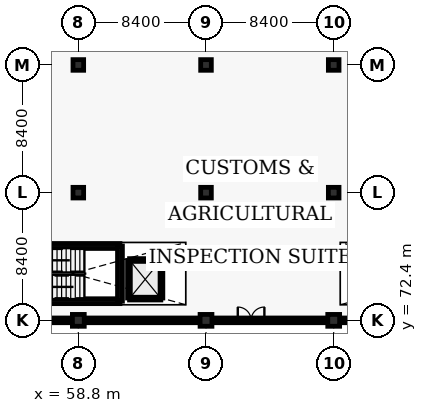
"""IFC4 building model, lengths in metres.
Left out: names, types, materials, properties, quantities, classifications, styles, units other than length and angle.
Written with IfcOpenShell. Run it as: python <this file> out.ifc"""

import sys

from ifc_helpers import new_model, si_unit, direction, frame, frame_2d, origin, origin_2d, place, context, subcontext, project, spatial, rectangle, circle, extrude, element, fill, save


model = new_model("IFC4")
c1 = context("Model", 3, precision=1e-05, world=origin(), true_north=direction((0.0, 1.0)))
c2 = subcontext(c1, "Body", "Model", "MODEL_VIEW")
j1 = project(units=[si_unit("LENGTHUNIT", "METRE"), si_unit("PLANEANGLEUNIT", "RADIAN")], contexts=[c1])
p1 = place(None, origin())
s1 = spatial("IfcSite", under=j1, at=p1, CompositionType="ELEMENT")
p2 = place(p1, origin())
s2 = spatial("IfcBuilding", under=s1, at=p2, CompositionType="ELEMENT")
p3 = place(p2, origin())
s3 = spatial("IfcBuildingStorey", under=s2, at=p3, CompositionType="ELEMENT", Elevation=0.0)
p4 = place(p3, frame((58.8, 72.4, -0.46), z_axis=(0.0, 0.0, 1.0), x_axis=(1.0, 0.0, 0.0)))
e1 = element("IfcColumn", 1, at=p4, inside=s3, PredefinedType="COLUMN", context=c2, shape_type="SweptSolid", body=[
    extrude(circle(Radius=0.39, at=origin_2d()), origin(), (0.0, 0.0, 1.0), 5.9),
])
for number, where, z_axis, x_axis in (
    (2, (58.8, 80.8, -0.46), (0.0, 0.0, 1.0), (1.0, 0.0, 0.0)),
    (3, (58.8, 89.2, -0.46), (0.0, 0.0, 1.0), (1.0, 0.0, 0.0)),
):
    element("IfcColumn", number, at=place(p3, frame(where, z_axis=z_axis, x_axis=x_axis)), inside=s3, PredefinedType="COLUMN", context=c2, shape_type="SweptSolid", body=[
        extrude(rectangle(XDim=0.7, YDim=0.7, at=origin_2d()), origin(), (0.0, 0.0, 1.0), 5.9),
    ])
p5 = place(p3, frame((67.2, 72.4, -0.46), z_axis=(0.0, 0.0, 1.0), x_axis=(1.0, 0.0, 0.0)))
e4 = element("IfcColumn", 4, at=p5, inside=s3, PredefinedType="COLUMN", context=c2, shape_type="SweptSolid", body=[
    extrude(circle(Radius=0.39, at=origin_2d()), origin(), (0.0, 0.0, 1.0), 5.9),
])
for number, where, z_axis, x_axis in (
    (5, (67.2, 80.8, -0.46), (0.0, 0.0, 1.0), (1.0, 0.0, 0.0)),
    (6, (67.2, 89.2, -0.46), (0.0, 0.0, 1.0), (1.0, 0.0, 0.0)),
):
    element("IfcColumn", number, at=place(p3, frame(where, z_axis=z_axis, x_axis=x_axis)), inside=s3, PredefinedType="COLUMN", context=c2, shape_type="SweptSolid", body=[
        extrude(rectangle(XDim=0.7, YDim=0.7, at=origin_2d()), origin(), (0.0, 0.0, 1.0), 5.9),
    ])
p6 = place(p3, frame((75.6, 72.4, -0.46), z_axis=(0.0, 0.0, 1.0), x_axis=(1.0, 0.0, 0.0)))
e7 = element("IfcColumn", 7, at=p6, inside=s3, PredefinedType="COLUMN", context=c2, shape_type="SweptSolid", body=[
    extrude(circle(Radius=0.39, at=origin_2d()), origin(), (0.0, 0.0, 1.0), 5.9),
])
for number, where, z_axis, x_axis in (
    (8, (75.6, 80.8, -0.46), (0.0, 0.0, 1.0), (1.0, 0.0, 0.0)),
    (9, (75.6, 89.2, -0.46), (0.0, 0.0, 1.0), (1.0, 0.0, 0.0)),
):
    element("IfcColumn", number, at=place(p3, frame(where, z_axis=z_axis, x_axis=x_axis)), inside=s3, PredefinedType="COLUMN", context=c2, shape_type="SweptSolid", body=[
        extrude(rectangle(XDim=0.7, YDim=0.7, at=origin_2d()), origin(), (0.0, 0.0, 1.0), 5.9),
    ])
p7 = place(p3, frame((50.79, 72.4, 0.0), z_axis=(0.0, 0.0, 1.0), x_axis=(1.0, 0.0, 0.0)))
e10 = element("IfcWall", 10, at=p7, inside=s3, PredefinedType="SOLIDWALL", context=c2, shape_type="SweptSolid", body=[
    extrude(rectangle(XDim=7.62, YDim=0.31, at=frame_2d((3.81, 0.0))), origin(), (0.0, 0.0, 1.0), 4.825),
])
p8 = place(p7, frame((1.7, 0.0, 0.0)))
e11 = element("IfcOpeningElement", 11, at=p8, cuts=e10, PredefinedType="OPENING", context=c2, shape_type="SweptSolid", body=[
    extrude(rectangle(XDim=1.75, YDim=2.15, at=frame_2d((0.875, 1.075))), frame((0.0, 0.165, 0.0), z_axis=(0.0, -1.0, 0.0), x_axis=(1.0, 0.0, 0.0)), (0.0, 0.0, 1.0), 0.33),
])
p9 = place(p7, frame((4.35, 0.0, 1.0)))
e12 = element("IfcOpeningElement", 12, at=p9, cuts=e10, PredefinedType="OPENING", context=c2, shape_type="SweptSolid", body=[
    extrude(rectangle(XDim=2.2, YDim=1.55, at=frame_2d((1.1, 0.775))), frame((0.0, 0.165, 0.0), z_axis=(0.0, -1.0, 0.0), x_axis=(1.0, 0.0, 0.0)), (0.0, 0.0, 1.0), 0.33),
])
p10 = place(p3, frame((59.19, 72.4, 0.0), z_axis=(0.0, 0.0, 1.0), x_axis=(1.0, 0.0, 0.0)))
e13 = element("IfcWall", 13, at=p10, inside=s3, PredefinedType="SOLIDWALL", context=c2, shape_type="SweptSolid", body=[
    extrude(rectangle(XDim=7.62, YDim=0.31, at=frame_2d((3.81, 0.0))), origin(), (0.0, 0.0, 1.0), 4.605),
])
p11 = place(p10, frame((2.8, 0.0, 1.0)))
e14 = element("IfcOpeningElement", 14, at=p11, cuts=e13, PredefinedType="OPENING", context=c2, shape_type="SweptSolid", body=[
    extrude(rectangle(XDim=1.9, YDim=1.55, at=frame_2d((0.95, 0.775))), frame((0.0, 0.165, 0.0), z_axis=(0.0, -1.0, 0.0), x_axis=(1.0, 0.0, 0.0)), (0.0, 0.0, 1.0), 0.33),
])
p12 = place(p3, frame((67.59, 72.4, 0.0), z_axis=(0.0, 0.0, 1.0), x_axis=(1.0, 0.0, 0.0)))
e15 = element("IfcWall", 15, at=p12, inside=s3, PredefinedType="SOLIDWALL", context=c2, shape_type="SweptSolid", body=[
    extrude(rectangle(XDim=7.62, YDim=0.31, at=frame_2d((3.81, 0.0))), origin(), (0.0, 0.0, 1.0), 4.605),
])
p13 = place(p12, frame((1.7, 0.0, 0.0)))
e16 = element("IfcOpeningElement", 16, at=p13, cuts=e15, PredefinedType="OPENING", context=c2, shape_type="SweptSolid", body=[
    extrude(rectangle(XDim=1.75, YDim=2.15, at=frame_2d((0.875, 1.075))), frame((0.0, 0.165, 0.0), z_axis=(0.0, -1.0, 0.0), x_axis=(1.0, 0.0, 0.0)), (0.0, 0.0, 1.0), 0.33),
])
p14 = place(p12, frame((4.35, 0.0, 1.0)))
e17 = element("IfcOpeningElement", 17, at=p14, cuts=e15, PredefinedType="OPENING", context=c2, shape_type="SweptSolid", body=[
    extrude(rectangle(XDim=2.2, YDim=1.55, at=frame_2d((1.1, 0.775))), frame((0.0, 0.165, 0.0), z_axis=(0.0, -1.0, 0.0), x_axis=(1.0, 0.0, 0.0)), (0.0, 0.0, 1.0), 0.33),
])
p15 = place(p3, frame((75.99, 72.4, 0.0), z_axis=(0.0, 0.0, 1.0), x_axis=(1.0, 0.0, 0.0)))
e18 = element("IfcWall", 18, at=p15, inside=s3, PredefinedType="SOLIDWALL", context=c2, shape_type="SweptSolid", body=[
    extrude(rectangle(XDim=7.62, YDim=0.31, at=frame_2d((3.81, 0.0))), origin(), (0.0, 0.0, 1.0), 4.605),
])
p16 = place(p15, frame((2.8, 0.0, 1.0)))
e19 = element("IfcOpeningElement", 19, at=p16, cuts=e18, PredefinedType="OPENING", context=c2, shape_type="SweptSolid", body=[
    extrude(rectangle(XDim=1.9, YDim=1.55, at=frame_2d((0.95, 0.775))), frame((0.0, 0.165, 0.0), z_axis=(0.0, -1.0, 0.0), x_axis=(1.0, 0.0, 0.0)), (0.0, 0.0, 1.0), 0.33),
])
for number, where, z_axis, x_axis in (
    (20, (52.66, 73.66, 0.0), (0.0, 0.0, 1.0), (1.0, 0.0, 0.0)),
    (21, (52.66, 77.29, 0.0), (0.0, 0.0, 1.0), (1.0, 0.0, 0.0)),
):
    element("IfcWall", number, at=place(p3, frame(where, z_axis=z_axis, x_axis=x_axis)), inside=s3, PredefinedType="SHEAR", context=c2, shape_type="SweptSolid", body=[
        extrude(rectangle(XDim=8.88, YDim=0.32, at=frame_2d((4.44, 0.0))), origin(), (0.0, 0.0, 1.0), 5.44),
    ])
p17 = place(p3, frame((61.54, 73.66, 0.0), z_axis=(0.0, 0.0, 1.0), x_axis=(0.0, 1.0, 0.0)))
e22 = element("IfcWall", 22, at=p17, inside=s3, PredefinedType="SHEAR", context=c2, shape_type="SweptSolid", body=[
    extrude(rectangle(XDim=3.63, YDim=0.32, at=frame_2d((1.815, 0.0))), origin(), (0.0, 0.0, 1.0), 5.44),
])
p18 = place(p3, frame((62.17, 73.87, 0.0), z_axis=(0.0, 0.0, 1.0), x_axis=(1.0, 0.0, 0.0)))
e23 = element("IfcWall", 23, at=p18, inside=s3, PredefinedType="SHEAR", context=c2, shape_type="SweptSolid", body=[
    extrude(rectangle(XDim=2.06, YDim=0.26, at=frame_2d((1.03, 0.0))), origin(), (0.0, 0.0, 1.0), 5.44),
])
for number, where, z_axis, x_axis in (
    (24, (64.23, 73.87, 0.0), (0.0, 0.0, 1.0), (0.0, 1.0, 0.0)),
    (25, (62.17, 76.33, 0.0), (0.0, 0.0, 1.0), (0.0, -1.0, 0.0)),
):
    element("IfcWall", number, at=place(p3, frame(where, z_axis=z_axis, x_axis=x_axis)), inside=s3, PredefinedType="SHEAR", context=c2, shape_type="SweptSolid", body=[
        extrude(rectangle(XDim=2.46, YDim=0.26, at=frame_2d((1.23, 0.0))), origin(), (0.0, 0.0, 1.0), 5.44),
    ])
p19 = place(p3, frame((62.17, 76.33, 0.0), z_axis=(0.0, 0.0, 1.0), x_axis=(1.0, 0.0, 0.0)))
e26 = element("IfcWall", 26, at=p19, inside=s3, PredefinedType="SHEAR", context=c2, shape_type="SweptSolid", body=[
    extrude(rectangle(XDim=2.06, YDim=0.26, at=frame_2d((1.03, 0.0))), origin(), (0.0, 0.0, 1.0), 5.44),
])
p20 = place(p19, frame((0.46, 0.0, 0.0)))
e27 = element("IfcOpeningElement", 27, at=p20, cuts=e26, PredefinedType="OPENING", context=c2, shape_type="SweptSolid", body=[
    extrude(rectangle(XDim=1.14, YDim=2.14, at=frame_2d((0.57, 1.07))), frame((0.0, 0.14, 0.0), z_axis=(0.0, -1.0, 0.0), x_axis=(1.0, 0.0, 0.0)), (0.0, 0.0, 1.0), 0.28),
])
p21 = place(p9, origin())
e28 = element("IfcWindow", 28, at=p21, inside=s3, PartitioningType="DOUBLE_PANEL_VERTICAL", PredefinedType="WINDOW", context=c2, shape_type="SweptSolid", body=[
    extrude(rectangle(XDim=2.2, YDim=1.55, at=frame_2d((1.1, 0.775))), frame((0.0, 0.03, 0.0), z_axis=(0.0, -1.0, 0.0), x_axis=(1.0, 0.0, 0.0)), (0.0, 0.0, 1.0), 0.06),
])
fill(e12, e28)
p22 = place(p11, origin())
e29 = element("IfcWindow", 29, at=p22, inside=s3, PartitioningType="DOUBLE_PANEL_VERTICAL", PredefinedType="WINDOW", context=c2, shape_type="SweptSolid", body=[
    extrude(rectangle(XDim=1.9, YDim=1.55, at=frame_2d((0.95, 0.775))), frame((0.0, 0.03, 0.0), z_axis=(0.0, -1.0, 0.0), x_axis=(1.0, 0.0, 0.0)), (0.0, 0.0, 1.0), 0.06),
])
fill(e14, e29)
p23 = place(p13, origin())
e30 = element("IfcDoor", 30, at=p23, inside=s3, OperationType="DOUBLE_DOOR_SINGLE_SWING", PredefinedType="DOOR", context=c2, shape_type="SweptSolid", body=[
    extrude(rectangle(XDim=1.75, YDim=2.15, at=frame_2d((0.875, 1.075))), frame((0.0, 0.025, 0.0), z_axis=(0.0, -1.0, 0.0), x_axis=(1.0, 0.0, 0.0)), (0.0, 0.0, 1.0), 0.05),
])
fill(e16, e30)
p24 = place(p14, origin())
e31 = element("IfcWindow", 31, at=p24, inside=s3, PartitioningType="DOUBLE_PANEL_VERTICAL", PredefinedType="WINDOW", context=c2, shape_type="SweptSolid", body=[
    extrude(rectangle(XDim=2.2, YDim=1.55, at=frame_2d((1.1, 0.775))), frame((0.0, 0.03, 0.0), z_axis=(0.0, -1.0, 0.0), x_axis=(1.0, 0.0, 0.0)), (0.0, 0.0, 1.0), 0.06),
])
fill(e17, e31)
p25 = place(p20, origin())
e32 = element("IfcDoor", 32, at=p25, inside=s3, OperationType="DOUBLE_DOOR_SLIDING", PredefinedType="DOOR", context=c2, shape_type="SweptSolid", body=[
    extrude(rectangle(XDim=1.14, YDim=2.14, at=frame_2d((0.57, 1.07))), frame((0.0, 0.025, 0.0), z_axis=(0.0, -1.0, 0.0), x_axis=(1.0, 0.0, 0.0)), (0.0, 0.0, 1.0), 0.05),
])
fill(e27, e32)
save(model, sys.argv[1])
